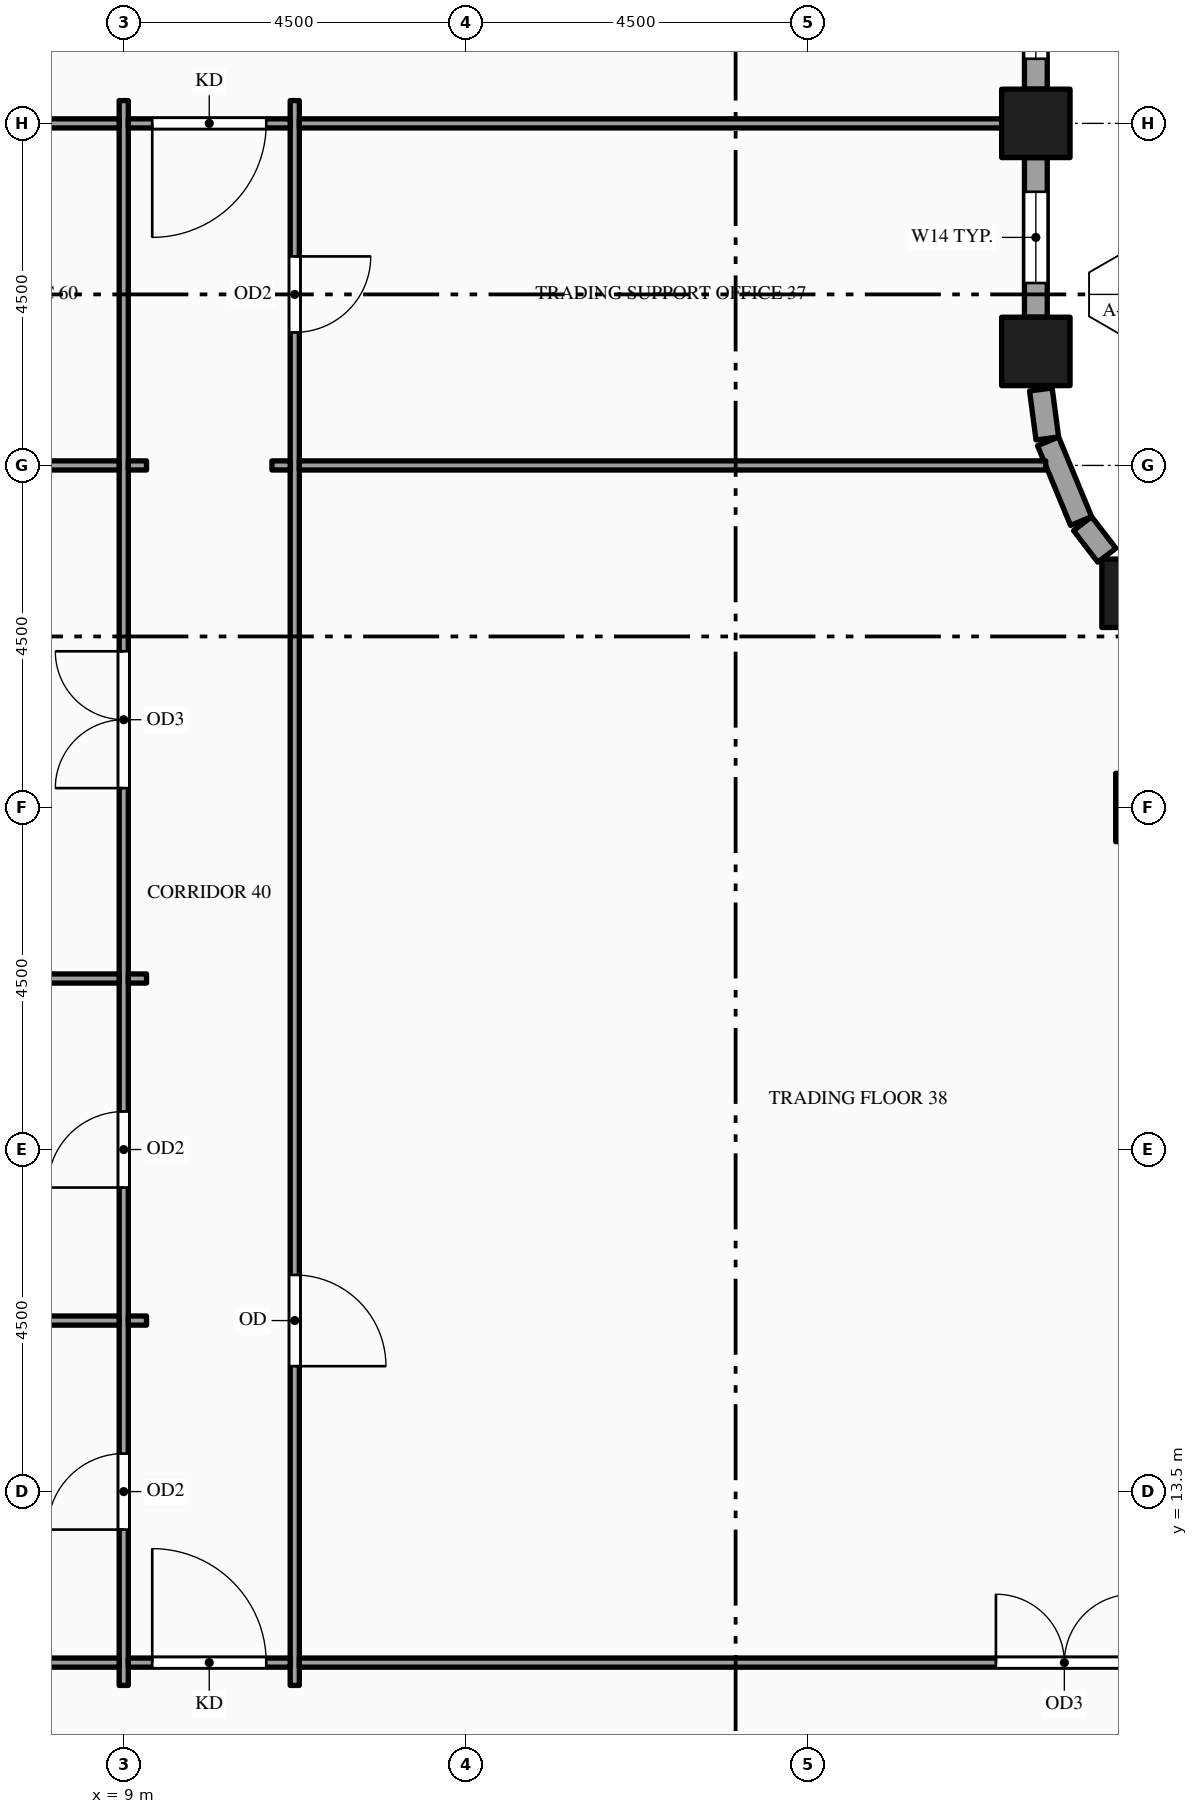
"""IFC4 building model, lengths in metres.
Left out: names, types, materials, properties, quantities, classifications, styles, units other than length and angle.
Written with IfcOpenShell. Run it as: python <this file> out.ifc"""

import sys

from ifc_helpers import new_model, si_unit, direction, frame, frame_2d, origin, origin_2d, place, context, subcontext, project, spatial, rectangle, hollow_rectangle, extrude, element, fill, save


model = new_model("IFC4")
c1 = context("Model", 3, precision=1e-05, world=origin(), true_north=direction((0.0, 1.0)))
c2 = subcontext(c1, "Body", "Model", "MODEL_VIEW")
j1 = project(units=[si_unit("LENGTHUNIT", "METRE"), si_unit("PLANEANGLEUNIT", "RADIAN")], contexts=[c1])
p1 = place(None, origin())
s1 = spatial("IfcSite", under=j1, at=p1, CompositionType="ELEMENT")
p2 = place(p1, origin())
s2 = spatial("IfcBuilding", under=s1, at=p2, CompositionType="ELEMENT")
p3 = place(p2, frame((0.0, 0.0, 143.0)))
s3 = spatial("IfcBuildingStorey", under=s2, at=p3, CompositionType="ELEMENT", Elevation=143.0)
for number, where, z_axis, x_axis in (
    (1, (21.0, 28.5, -0.15), (0.0, 0.0, 1.0), (1.0, 0.0, 0.0)),
    (2, (21.0, 31.5, -0.15), (0.0, 0.0, 1.0), (1.0, 0.0, 0.0)),
    (3, (22.318, 25.318, -0.15), (0.0, 0.0, 1.0), (1.0, 0.0, 0.0)),
    (4, (22.5, 22.5, -0.15), (0.0, 0.0, 1.0), (1.0, 0.0, 0.0)),
):
    element("IfcColumn", number, at=place(p3, frame(where, z_axis=z_axis, x_axis=x_axis)), inside=s3, PredefinedType="COLUMN", context=c2, shape_type="SweptSolid", body=[
        extrude(hollow_rectangle(XDim=0.9, YDim=0.9, WallThickness=0.045, at=origin_2d()), origin(), (0.0, 0.0, 1.0), 4.0),
    ])
p4 = place(p3, frame((21.934, 25.819, 0.0), z_axis=(0.0, 0.0, 1.0), x_axis=(-0.608539141726, 0.793523857856, 0.0)))
e5 = element("IfcWall", 5, at=p4, inside=s3, PredefinedType="STANDARD", context=c2, shape_type="SweptSolid", body=[
    extrude(rectangle(XDim=0.524, YDim=0.3, at=frame_2d((0.262, 0.0))), origin(), (0.0, 0.0, 1.0), 3.149),
])
p5 = place(p3, frame((21.595, 26.268, 0.0), z_axis=(0.0, 0.0, 1.0), x_axis=(-0.382598720491, 0.923914616768, 0.0)))
e6 = element("IfcWall", 6, at=p5, inside=s3, PredefinedType="STANDARD", context=c2, shape_type="SweptSolid", body=[
    extrude(rectangle(XDim=1.135, YDim=0.3, at=frame_2d((0.568, 0.0))), origin(), (0.0, 0.0, 1.0), 3.149),
])
p6 = place(p3, frame((21.151, 27.355, 0.0), z_axis=(0.0, 0.0, 1.0), x_axis=(-0.130687655177, 0.991423590996, 0.0)))
e7 = element("IfcWall", 7, at=p6, inside=s3, PredefinedType="STANDARD", context=c2, shape_type="SweptSolid", body=[
    extrude(rectangle(XDim=0.65, YDim=0.3, at=frame_2d((0.325, 0.0))), origin(), (0.0, 0.0, 1.0), 3.149),
])
p7 = place(p3, frame((21.0, 28.95, 0.0), z_axis=(0.0, 0.0, 1.0), x_axis=(0.0, 1.0, 0.0)))
e8 = element("IfcWall", 8, at=p7, inside=s3, PredefinedType="STANDARD", context=c2, shape_type="SweptSolid", body=[
    extrude(rectangle(XDim=2.1, YDim=0.3, at=frame_2d((1.05, 0.0))), origin(), (0.0, 0.0, 1.0), 3.149),
])
p8 = place(p7, frame((0.45, 0.0, 0.9)))
e9 = element("IfcOpeningElement", 9, at=p8, cuts=e8, PredefinedType="OPENING", context=c2, shape_type="SweptSolid", body=[
    extrude(rectangle(XDim=1.2, YDim=2.0, at=frame_2d((0.6, 1.0))), frame((0.0, 0.16, 0.0), z_axis=(0.0, -1.0, 0.0), x_axis=(1.0, 0.0, 0.0)), (0.0, 0.0, 1.0), 0.32),
])
p9 = place(p3, frame((21.0, 31.95, 0.0), z_axis=(0.0, 0.0, 1.0), x_axis=(0.0, 1.0, 0.0)))
e10 = element("IfcWall", 10, at=p9, inside=s3, PredefinedType="STANDARD", context=c2, shape_type="SweptSolid", body=[
    extrude(rectangle(XDim=4.05, YDim=0.3, at=frame_2d((2.025, 0.0))), origin(), (0.0, 0.0, 1.0), 3.149),
])
p10 = place(p9, frame((0.4, 0.0, 0.9)))
e11 = element("IfcOpeningElement", 11, at=p10, cuts=e10, PredefinedType="OPENING", context=c2, shape_type="SweptSolid", body=[
    extrude(rectangle(XDim=1.1, YDim=2.0, at=frame_2d((0.55, 1.0))), frame((0.0, 0.16, 0.0), z_axis=(0.0, -1.0, 0.0), x_axis=(1.0, 0.0, 0.0)), (0.0, 0.0, 1.0), 0.32),
])
p11 = place(p9, frame((2.1, 0.0, 0.9)))
e12 = element("IfcOpeningElement", 12, at=p11, cuts=e10, PredefinedType="OPENING", context=c2, shape_type="SweptSolid", body=[
    extrude(rectangle(XDim=1.55, YDim=2.0, at=frame_2d((0.775, 1.0))), frame((0.0, 0.16, 0.0), z_axis=(0.0, -1.0, 0.0), x_axis=(1.0, 0.0, 0.0)), (0.0, 0.0, 1.0), 0.32),
])
p12 = place(p3, frame((9.0, 10.95, 0.0), z_axis=(0.0, 0.0, 1.0), x_axis=(0.0, 1.0, 0.0)))
e13 = element("IfcWall", 13, at=p12, inside=s3, PredefinedType="PARTITIONING", context=c2, shape_type="SweptSolid", body=[
    extrude(rectangle(XDim=20.85, YDim=0.12, at=frame_2d((10.425, 0.0))), origin(), (0.0, 0.0, 1.0), 2.6),
])
p13 = place(p12, frame((2.05, 0.0, 0.0)))
e14 = element("IfcOpeningElement", 14, at=p13, cuts=e13, PredefinedType="OPENING", context=c2, shape_type="SweptSolid", body=[
    extrude(rectangle(XDim=1.0, YDim=2.1, at=frame_2d((0.5, 1.05))), frame((0.0, 0.07, 0.0), z_axis=(0.0, -1.0, 0.0), x_axis=(1.0, 0.0, 0.0)), (0.0, 0.0, 1.0), 0.14),
])
p14 = place(p12, frame((6.55, 0.0, 0.0)))
e15 = element("IfcOpeningElement", 15, at=p14, cuts=e13, PredefinedType="OPENING", context=c2, shape_type="SweptSolid", body=[
    extrude(rectangle(XDim=1.0, YDim=2.1, at=frame_2d((0.5, 1.05))), frame((0.0, 0.07, 0.0), z_axis=(0.0, -1.0, 0.0), x_axis=(1.0, 0.0, 0.0)), (0.0, 0.0, 1.0), 0.14),
])
p15 = place(p12, frame((11.805, 0.0, 0.0)))
e16 = element("IfcOpeningElement", 16, at=p15, cuts=e13, PredefinedType="OPENING", context=c2, shape_type="SweptSolid", body=[
    extrude(rectangle(XDim=1.8, YDim=2.1, at=frame_2d((0.9, 1.05))), frame((0.0, 0.07, 0.0), z_axis=(0.0, -1.0, 0.0), x_axis=(1.0, 0.0, 0.0)), (0.0, 0.0, 1.0), 0.14),
])
p16 = place(p3, frame((11.25, 10.95, 0.0), z_axis=(0.0, 0.0, 1.0), x_axis=(0.0, 1.0, 0.0)))
e17 = element("IfcWall", 17, at=p16, inside=s3, PredefinedType="PARTITIONING", context=c2, shape_type="SweptSolid", body=[
    extrude(rectangle(XDim=20.85, YDim=0.12, at=frame_2d((10.425, 0.0))), origin(), (0.0, 0.0, 1.0), 2.6),
])
p17 = place(p16, frame((17.8, 0.0, 0.0)))
e18 = element("IfcOpeningElement", 18, at=p17, cuts=e17, PredefinedType="OPENING", context=c2, shape_type="SweptSolid", body=[
    extrude(rectangle(XDim=1.0, YDim=2.1, at=frame_2d((0.5, 1.05))), frame((0.0, 0.07, 0.0), z_axis=(0.0, -1.0, 0.0), x_axis=(1.0, 0.0, 0.0)), (0.0, 0.0, 1.0), 0.14),
])
p18 = place(p16, frame((4.2, 0.0, 0.0)))
e19 = element("IfcOpeningElement", 19, at=p18, cuts=e17, PredefinedType="OPENING", context=c2, shape_type="SweptSolid", body=[
    extrude(rectangle(XDim=1.2, YDim=2.1, at=frame_2d((0.6, 1.05))), frame((0.0, 0.07, 0.0), z_axis=(0.0, -1.0, 0.0), x_axis=(1.0, 0.0, 0.0)), (0.0, 0.0, 1.0), 0.14),
])
p19 = place(p3, frame((0.15, 11.25, 0.0), z_axis=(0.0, 0.0, 1.0), x_axis=(1.0, 0.0, 0.0)))
e20 = element("IfcWall", 20, at=p19, inside=s3, PredefinedType="PARTITIONING", context=c2, shape_type="SweptSolid", body=[
    extrude(rectangle(XDim=8.79, YDim=0.12, at=frame_2d((4.395, 0.0))), origin(), (0.0, 0.0, 1.0), 2.87),
])
p20 = place(p3, frame((9.06, 11.25, 0.0), z_axis=(0.0, 0.0, 1.0), x_axis=(1.0, 0.0, 0.0)))
e21 = element("IfcWall", 21, at=p20, inside=s3, PredefinedType="PARTITIONING", context=c2, shape_type="SweptSolid", body=[
    extrude(rectangle(XDim=2.13, YDim=0.12, at=frame_2d((1.065, 0.0))), origin(), (0.0, 0.0, 1.0), 2.87),
])
p21 = place(p20, frame((0.315, 0.0, 0.0)))
e22 = element("IfcOpeningElement", 22, at=p21, cuts=e21, PredefinedType="OPENING", context=c2, shape_type="SweptSolid", body=[
    extrude(rectangle(XDim=1.5, YDim=2.1, at=frame_2d((0.75, 1.05))), frame((0.0, 0.07, 0.0), z_axis=(0.0, -1.0, 0.0), x_axis=(1.0, 0.0, 0.0)), (0.0, 0.0, 1.0), 0.14),
])
p22 = place(p3, frame((11.31, 11.25, 0.0), z_axis=(0.0, 0.0, 1.0), x_axis=(1.0, 0.0, 0.0)))
e23 = element("IfcWall", 23, at=p22, inside=s3, PredefinedType="PARTITIONING", context=c2, shape_type="SweptSolid", body=[
    extrude(rectangle(XDim=20.04, YDim=0.12, at=frame_2d((10.02, 0.0))), origin(), (0.0, 0.0, 1.0), 2.87),
])
p23 = place(p22, frame((9.165, 0.0, 0.0)))
e24 = element("IfcOpeningElement", 24, at=p23, cuts=e23, PredefinedType="OPENING", context=c2, shape_type="SweptSolid", body=[
    extrude(rectangle(XDim=1.8, YDim=2.1, at=frame_2d((0.9, 1.05))), frame((0.0, 0.07, 0.0), z_axis=(0.0, -1.0, 0.0), x_axis=(1.0, 0.0, 0.0)), (0.0, 0.0, 1.0), 0.14),
])
p24 = place(p3, frame((0.15, 15.75, 0.0), z_axis=(0.0, 0.0, 1.0), x_axis=(1.0, 0.0, 0.0)))
e25 = element("IfcWall", 25, at=p24, inside=s3, PredefinedType="PARTITIONING", context=c2, shape_type="SweptSolid", body=[
    extrude(rectangle(XDim=8.79, YDim=0.12, at=frame_2d((4.395, 0.0))), origin(), (0.0, 0.0, 1.0), 2.87),
])
p25 = place(p3, frame((9.06, 15.75, 0.0), z_axis=(0.0, 0.0, 1.0), x_axis=(1.0, 0.0, 0.0)))
e26 = element("IfcWall", 26, at=p25, inside=s3, PredefinedType="PARTITIONING", context=c2, shape_type="SweptSolid", body=[
    extrude(rectangle(XDim=0.24, YDim=0.12, at=frame_2d((0.12, 0.0))), origin(), (0.0, 0.0, 1.0), 2.87),
])
p26 = place(p3, frame((0.15, 20.25, 0.0), z_axis=(0.0, 0.0, 1.0), x_axis=(1.0, 0.0, 0.0)))
e27 = element("IfcWall", 27, at=p26, inside=s3, PredefinedType="PARTITIONING", context=c2, shape_type="SweptSolid", body=[
    extrude(rectangle(XDim=8.79, YDim=0.12, at=frame_2d((4.395, 0.0))), origin(), (0.0, 0.0, 1.0), 2.87),
])
p27 = place(p3, frame((9.06, 20.25, 0.0), z_axis=(0.0, 0.0, 1.0), x_axis=(1.0, 0.0, 0.0)))
e28 = element("IfcWall", 28, at=p27, inside=s3, PredefinedType="PARTITIONING", context=c2, shape_type="SweptSolid", body=[
    extrude(rectangle(XDim=0.24, YDim=0.12, at=frame_2d((0.12, 0.0))), origin(), (0.0, 0.0, 1.0), 2.87),
])
p28 = place(p3, frame((5.56, 27.0, 0.0), z_axis=(0.0, 0.0, 1.0), x_axis=(1.0, 0.0, 0.0)))
e29 = element("IfcWall", 29, at=p28, inside=s3, PredefinedType="PARTITIONING", context=c2, shape_type="SweptSolid", body=[
    extrude(rectangle(XDim=3.38, YDim=0.12, at=frame_2d((1.69, 0.0))), origin(), (0.0, 0.0, 1.0), 2.87),
])
for number, where, z_axis, x_axis in (
    (30, (9.06, 27.0, 0.0), (0.0, 0.0, 1.0), (1.0, 0.0, 0.0)),
    (31, (10.95, 27.0, 0.0), (0.0, 0.0, 1.0), (1.0, 0.0, 0.0)),
):
    element("IfcWall", number, at=place(p3, frame(where, z_axis=z_axis, x_axis=x_axis)), inside=s3, PredefinedType="PARTITIONING", context=c2, shape_type="SweptSolid", body=[
        extrude(rectangle(XDim=0.24, YDim=0.12, at=frame_2d((0.12, 0.0))), origin(), (0.0, 0.0, 1.0), 2.87),
    ])
p29 = place(p3, frame((11.31, 27.0, 0.0), z_axis=(0.0, 0.0, 1.0), x_axis=(1.0, 0.0, 0.0)))
e32 = element("IfcWall", 32, at=p29, inside=s3, PredefinedType="PARTITIONING", context=c2, shape_type="SweptSolid", body=[
    extrude(rectangle(XDim=9.82, YDim=0.12, at=frame_2d((4.91, 0.0))), origin(), (0.0, 0.0, 1.0), 2.87),
])
p30 = place(p3, frame((5.56, 31.5, 0.0), z_axis=(0.0, 0.0, 1.0), x_axis=(1.0, 0.0, 0.0)))
e33 = element("IfcWall", 33, at=p30, inside=s3, PredefinedType="PARTITIONING", context=c2, shape_type="SweptSolid", body=[
    extrude(rectangle(XDim=3.38, YDim=0.12, at=frame_2d((1.69, 0.0))), origin(), (0.0, 0.0, 1.0), 2.87),
])
p31 = place(p30, frame((1.19, 0.0, 0.0)))
e34 = element("IfcOpeningElement", 34, at=p31, cuts=e33, PredefinedType="OPENING", context=c2, shape_type="SweptSolid", body=[
    extrude(rectangle(XDim=1.0, YDim=2.1, at=frame_2d((0.5, 1.05))), frame((0.0, 0.07, 0.0), z_axis=(0.0, -1.0, 0.0), x_axis=(1.0, 0.0, 0.0)), (0.0, 0.0, 1.0), 0.14),
])
p32 = place(p3, frame((9.06, 31.5, 0.0), z_axis=(0.0, 0.0, 1.0), x_axis=(1.0, 0.0, 0.0)))
e35 = element("IfcWall", 35, at=p32, inside=s3, PredefinedType="PARTITIONING", context=c2, shape_type="SweptSolid", body=[
    extrude(rectangle(XDim=2.13, YDim=0.12, at=frame_2d((1.065, 0.0))), origin(), (0.0, 0.0, 1.0), 2.87),
])
p33 = place(p32, frame((0.315, 0.0, 0.0)))
e36 = element("IfcOpeningElement", 36, at=p33, cuts=e35, PredefinedType="OPENING", context=c2, shape_type="SweptSolid", body=[
    extrude(rectangle(XDim=1.5, YDim=2.1, at=frame_2d((0.75, 1.05))), frame((0.0, 0.07, 0.0), z_axis=(0.0, -1.0, 0.0), x_axis=(1.0, 0.0, 0.0)), (0.0, 0.0, 1.0), 0.14),
])
p34 = place(p3, frame((11.31, 31.5, 0.0), z_axis=(0.0, 0.0, 1.0), x_axis=(1.0, 0.0, 0.0)))
e37 = element("IfcWall", 37, at=p34, inside=s3, PredefinedType="PARTITIONING", context=c2, shape_type="SweptSolid", body=[
    extrude(rectangle(XDim=9.54, YDim=0.12, at=frame_2d((4.77, 0.0))), origin(), (0.0, 0.0, 1.0), 2.87),
])
p35 = place(p8, origin())
e38 = element("IfcWindow", 38, at=p35, inside=s3, PartitioningType="SINGLE_PANEL", PredefinedType="WINDOW", context=c2, shape_type="SweptSolid", body=[
    extrude(rectangle(XDim=1.2, YDim=2.0, at=frame_2d((0.6, 1.0))), frame((0.0, 0.03, 0.0), z_axis=(0.0, -1.0, 0.0), x_axis=(1.0, 0.0, 0.0)), (0.0, 0.0, 1.0), 0.06),
])
fill(e9, e38)
p36 = place(p10, origin())
e39 = element("IfcWindow", 39, at=p36, inside=s3, PartitioningType="SINGLE_PANEL", PredefinedType="WINDOW", context=c2, shape_type="SweptSolid", body=[
    extrude(rectangle(XDim=1.1, YDim=2.0, at=frame_2d((0.55, 1.0))), frame((0.0, 0.03, 0.0), z_axis=(0.0, -1.0, 0.0), x_axis=(1.0, 0.0, 0.0)), (0.0, 0.0, 1.0), 0.06),
])
fill(e11, e39)
p37 = place(p23, origin())
e40 = element("IfcDoor", 40, at=p37, inside=s3, OperationType="DOUBLE_DOOR_SINGLE_SWING", PredefinedType="DOOR", context=c2, shape_type="SweptSolid", body=[
    extrude(rectangle(XDim=1.8, YDim=2.1, at=frame_2d((0.9, 1.05))), frame((0.0, 0.025, 0.0), z_axis=(0.0, -1.0, 0.0), x_axis=(1.0, 0.0, 0.0)), (0.0, 0.0, 1.0), 0.05),
])
fill(e24, e40)
p38 = place(p21, origin())
e41 = element("IfcDoor", 41, at=p38, inside=s3, OperationType="SINGLE_SWING_LEFT", PredefinedType="DOOR", context=c2, shape_type="SweptSolid", body=[
    extrude(rectangle(XDim=1.5, YDim=2.1, at=frame_2d((0.75, 1.05))), frame((0.0, 0.025, 0.0), z_axis=(0.0, -1.0, 0.0), x_axis=(1.0, 0.0, 0.0)), (0.0, 0.0, 1.0), 0.05),
])
fill(e22, e41)
p39 = place(p33, origin())
e42 = element("IfcDoor", 42, at=p39, inside=s3, OperationType="SINGLE_SWING_LEFT", PredefinedType="DOOR", context=c2, shape_type="SweptSolid", body=[
    extrude(rectangle(XDim=1.5, YDim=2.1, at=frame_2d((0.75, 1.05))), frame((0.0, 0.025, 0.0), z_axis=(0.0, -1.0, 0.0), x_axis=(1.0, 0.0, 0.0)), (0.0, 0.0, 1.0), 0.05),
])
fill(e36, e42)
p40 = place(p13, origin())
e43 = element("IfcDoor", 43, at=p40, inside=s3, OperationType="SINGLE_SWING_LEFT", PredefinedType="DOOR", context=c2, shape_type="SweptSolid", body=[
    extrude(rectangle(XDim=1.0, YDim=2.1, at=frame_2d((0.5, 1.05))), frame((0.0, 0.025, 0.0), z_axis=(0.0, -1.0, 0.0), x_axis=(1.0, 0.0, 0.0)), (0.0, 0.0, 1.0), 0.05),
])
fill(e14, e43)
p41 = place(p14, origin())
e44 = element("IfcDoor", 44, at=p41, inside=s3, OperationType="SINGLE_SWING_LEFT", PredefinedType="DOOR", context=c2, shape_type="SweptSolid", body=[
    extrude(rectangle(XDim=1.0, YDim=2.1, at=frame_2d((0.5, 1.05))), frame((0.0, 0.025, 0.0), z_axis=(0.0, -1.0, 0.0), x_axis=(1.0, 0.0, 0.0)), (0.0, 0.0, 1.0), 0.05),
])
fill(e15, e44)
p42 = place(p15, origin())
e45 = element("IfcDoor", 45, at=p42, inside=s3, OperationType="DOUBLE_DOOR_SINGLE_SWING", PredefinedType="DOOR", context=c2, shape_type="SweptSolid", body=[
    extrude(rectangle(XDim=1.8, YDim=2.1, at=frame_2d((0.9, 1.05))), frame((0.0, 0.025, 0.0), z_axis=(0.0, -1.0, 0.0), x_axis=(1.0, 0.0, 0.0)), (0.0, 0.0, 1.0), 0.05),
])
fill(e16, e45)
p43 = place(p17, origin())
e46 = element("IfcDoor", 46, at=p43, inside=s3, OperationType="SINGLE_SWING_RIGHT", PredefinedType="DOOR", context=c2, shape_type="SweptSolid", body=[
    extrude(rectangle(XDim=1.0, YDim=2.1, at=frame_2d((0.5, 1.05))), frame((0.0, 0.025, 0.0), z_axis=(0.0, -1.0, 0.0), x_axis=(1.0, 0.0, 0.0)), (0.0, 0.0, 1.0), 0.05),
])
fill(e18, e46)
p44 = place(p18, origin())
e47 = element("IfcDoor", 47, at=p44, inside=s3, OperationType="SINGLE_SWING_LEFT", PredefinedType="DOOR", context=c2, shape_type="SweptSolid", body=[
    extrude(rectangle(XDim=1.2, YDim=2.1, at=frame_2d((0.6, 1.05))), frame((0.0, 0.025, 0.0), z_axis=(0.0, -1.0, 0.0), x_axis=(1.0, 0.0, 0.0)), (0.0, 0.0, 1.0), 0.05),
])
fill(e19, e47)
save(model, sys.argv[1])
